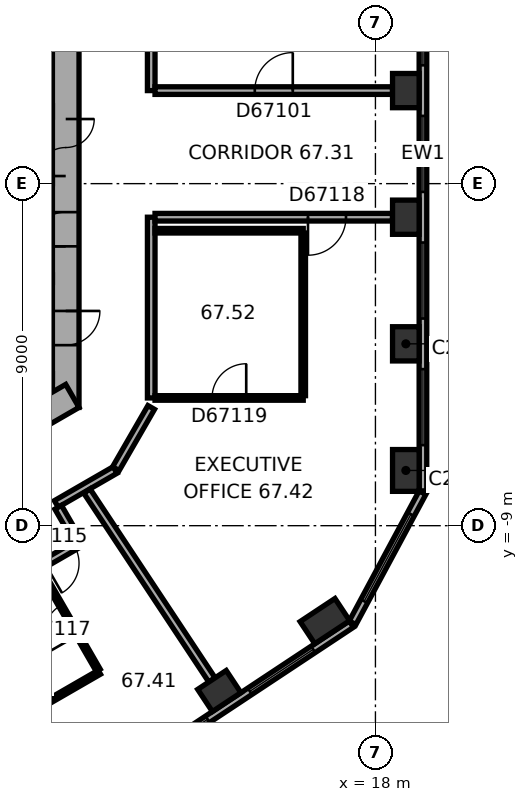
"""IFC4 building model, lengths in metres.
Left out: names, types, materials, properties, quantities, classifications, styles, units other than length and angle.
Written with IfcOpenShell. Run it as: python <this file> out.ifc"""

import sys

from ifc_helpers import new_model, si_unit, direction, frame, frame_2d, origin, origin_2d, place, context, subcontext, project, spatial, rectangle, extrude, element, fill, save


model = new_model("IFC4")
c1 = context("Model", 3, precision=1e-05, world=origin(), true_north=direction((0.0, 1.0)))
c2 = subcontext(c1, "Body", "Model", "MODEL_VIEW")
j1 = project(units=[si_unit("LENGTHUNIT", "METRE"), si_unit("PLANEANGLEUNIT", "RADIAN")], contexts=[c1])
p1 = place(None, origin())
s1 = spatial("IfcSite", under=j1, at=p1, CompositionType="ELEMENT")
p2 = place(p1, origin())
s2 = spatial("IfcBuilding", under=s1, at=p2, CompositionType="ELEMENT")
p3 = place(p2, frame((0.0, 0.0, 270.9)))
s3 = spatial("IfcBuildingStorey", under=s2, at=p3, CompositionType="ELEMENT", Elevation=270.9)
p4 = place(p3, frame((18.8, -7.547, 0.0), z_axis=(0.0, 0.0, 1.0), x_axis=(0.0, 1.0, 0.0)))
e1 = element("IfcColumn", 1, at=p4, inside=s3, PredefinedType="COLUMN", context=c2, shape_type="SweptSolid", body=[
    extrude(rectangle(XDim=1.1, YDim=0.7, at=origin_2d()), origin(), (0.0, 0.0, 1.0), 3.7),
])
for number, where, z_axis, x_axis in (
    (2, (18.8, -4.215, 0.0), (0.0, 0.0, 1.0), (0.0, 1.0, 0.0)),
    (3, (18.8, -0.883, 0.0), (0.0, 0.0, 1.0), (0.0, 1.0, 0.0)),
    (4, (18.8, 2.448, 0.0), (0.0, 0.0, 1.0), (0.0, 1.0, 0.0)),
    (5, (13.891, -13.351, 0.0), (0.0, 0.0, 1.0), (0.834, 0.552, 0.0)),
):
    element("IfcColumn", number, at=place(p3, frame(where, z_axis=z_axis, x_axis=x_axis)), inside=s3, PredefinedType="COLUMN", context=c2, shape_type="SweptSolid", body=[
        extrude(rectangle(XDim=0.9, YDim=0.7, at=origin_2d()), origin(), (0.0, 0.0, 1.0), 3.7),
    ])
p5 = place(p3, frame((16.669, -11.512, 0.0), z_axis=(0.0, 0.0, 1.0), x_axis=(0.833885822067, 0.551936985312, 0.0)))
e6 = element("IfcColumn", 6, at=p5, inside=s3, PredefinedType="COLUMN", context=c2, shape_type="SweptSolid", body=[
    extrude(rectangle(XDim=1.1, YDim=0.7, at=origin_2d()), origin(), (0.0, 0.0, 1.0), 3.7),
])
p6 = place(p3, frame((9.85, -5.889, 0.0), z_axis=(0.0, 0.0, 1.0), x_axis=(0.0, 1.0, 0.0)))
e7 = element("IfcWall", 7, at=p6, inside=s3, PredefinedType="SHEAR", context=c2, shape_type="SweptSolid", body=[
    extrude(rectangle(XDim=11.778, YDim=0.7, at=frame_2d((5.889, 0.0))), origin(), (0.0, 0.0, 1.0), 3.7),
])
p7 = place(p6, frame((6.089, 0.0, 0.0)))
e8 = element("IfcOpeningElement", 8, at=p7, cuts=e7, PredefinedType="OPENING", context=c2, shape_type="SweptSolid", body=[
    extrude(rectangle(XDim=1.5, YDim=2.1, at=frame_2d((0.75, 1.05))), frame((0.0, 0.36, 0.0), z_axis=(0.0, -1.0, 0.0), x_axis=(1.0, 0.0, 0.0)), (0.0, 0.0, 1.0), 0.72),
])
p8 = place(p6, frame((1.639, 0.0, 0.0)))
e9 = element("IfcOpeningElement", 9, at=p8, cuts=e7, PredefinedType="OPENING", context=c2, shape_type="SweptSolid", body=[
    extrude(rectangle(XDim=0.9, YDim=2.1, at=frame_2d((0.45, 1.05))), frame((0.0, 0.36, 0.0), z_axis=(0.0, -1.0, 0.0), x_axis=(1.0, 0.0, 0.0)), (0.0, 0.0, 1.0), 0.72),
])
p9 = place(p6, frame((4.239, 0.0, 0.0)))
e10 = element("IfcOpeningElement", 10, at=p9, cuts=e7, PredefinedType="OPENING", context=c2, shape_type="SweptSolid", body=[
    extrude(rectangle(XDim=0.9, YDim=2.1, at=frame_2d((0.45, 1.05))), frame((0.0, 0.36, 0.0), z_axis=(0.0, -1.0, 0.0), x_axis=(1.0, 0.0, 0.0)), (0.0, 0.0, 1.0), 0.72),
])
p10 = place(p3, frame((-0.175, -11.475, 0.0), z_axis=(0.0, 0.0, 1.0), x_axis=(0.866026453023, 0.499998182661, 0.0)))
e11 = element("IfcWall", 11, at=p10, inside=s3, PredefinedType="SHEAR", context=c2, shape_type="SweptSolid", body=[
    extrude(rectangle(XDim=11.778, YDim=0.7, at=frame_2d((5.889, 0.0))), origin(), (0.0, 0.0, 1.0), 3.7),
])
p11 = place(p10, frame((2.439, 0.0, 0.0)))
e12 = element("IfcOpeningElement", 12, at=p11, cuts=e11, PredefinedType="OPENING", context=c2, shape_type="SweptSolid", body=[
    extrude(rectangle(XDim=1.1, YDim=2.1, at=frame_2d((0.55, 1.05))), frame((0.0, 0.36, 0.0), z_axis=(0.0, -1.0, 0.0), x_axis=(1.0, 0.0, 0.0)), (0.0, 0.0, 1.0), 0.72),
])
p12 = place(p10, frame((5.039, 0.0, 0.0)))
e13 = element("IfcOpeningElement", 13, at=p12, cuts=e11, PredefinedType="OPENING", context=c2, shape_type="SweptSolid", body=[
    extrude(rectangle(XDim=1.1, YDim=2.1, at=frame_2d((0.55, 1.05))), frame((0.0, 0.36, 0.0), z_axis=(0.0, -1.0, 0.0), x_axis=(1.0, 0.0, 0.0)), (0.0, 0.0, 1.0), 0.72),
])
p13 = place(p10, frame((7.639, 0.0, 0.0)))
e14 = element("IfcOpeningElement", 14, at=p13, cuts=e11, PredefinedType="OPENING", context=c2, shape_type="SweptSolid", body=[
    extrude(rectangle(XDim=1.1, YDim=2.1, at=frame_2d((0.55, 1.05))), frame((0.0, 0.36, 0.0), z_axis=(0.0, -1.0, 0.0), x_axis=(1.0, 0.0, 0.0)), (0.0, 0.0, 1.0), 0.72),
])
p14 = place(p3, frame((19.25, -8.084, 0.0), z_axis=(0.0, 0.0, 1.0), x_axis=(0.0, 1.0, 0.0)))
e15 = element("IfcWall", 15, at=p14, inside=s3, PredefinedType="STANDARD", context=c2, shape_type="SweptSolid", body=[
    extrude(rectangle(XDim=17.731, YDim=0.2, at=frame_2d((8.866, 0.0))), origin(), (0.0, 0.0, 1.0), 3.7),
])
p15 = place(p14, frame((1.203, 0.0, 0.9)))
e16 = element("IfcOpeningElement", 16, at=p15, cuts=e15, PredefinedType="OPENING", context=c2, shape_type="SweptSolid", body=[
    extrude(rectangle(XDim=2.0, YDim=2.0, at=frame_2d((1.0, 1.0))), frame((0.0, 0.11, 0.0), z_axis=(0.0, -1.0, 0.0), x_axis=(1.0, 0.0, 0.0)), (0.0, 0.0, 1.0), 0.22),
])
p16 = place(p14, frame((4.535, 0.0, 0.9)))
e17 = element("IfcOpeningElement", 17, at=p16, cuts=e15, PredefinedType="OPENING", context=c2, shape_type="SweptSolid", body=[
    extrude(rectangle(XDim=2.0, YDim=2.0, at=frame_2d((1.0, 1.0))), frame((0.0, 0.11, 0.0), z_axis=(0.0, -1.0, 0.0), x_axis=(1.0, 0.0, 0.0)), (0.0, 0.0, 1.0), 0.22),
])
p17 = place(p14, frame((7.866, 0.0, 0.9)))
e18 = element("IfcOpeningElement", 18, at=p17, cuts=e15, PredefinedType="OPENING", context=c2, shape_type="SweptSolid", body=[
    extrude(rectangle(XDim=2.0, YDim=2.0, at=frame_2d((1.0, 1.0))), frame((0.0, 0.11, 0.0), z_axis=(0.0, -1.0, 0.0), x_axis=(1.0, 0.0, 0.0)), (0.0, 0.0, 1.0), 0.22),
])
p18 = place(p14, frame((11.198, 0.0, 0.9)))
e19 = element("IfcOpeningElement", 19, at=p18, cuts=e15, PredefinedType="OPENING", context=c2, shape_type="SweptSolid", body=[
    extrude(rectangle(XDim=2.0, YDim=2.0, at=frame_2d((1.0, 1.0))), frame((0.0, 0.11, 0.0), z_axis=(0.0, -1.0, 0.0), x_axis=(1.0, 0.0, 0.0)), (0.0, 0.0, 1.0), 0.22),
])
p19 = place(p14, frame((14.53, 0.0, 0.9)))
e20 = element("IfcOpeningElement", 20, at=p19, cuts=e15, PredefinedType="OPENING", context=c2, shape_type="SweptSolid", body=[
    extrude(rectangle(XDim=2.0, YDim=2.0, at=frame_2d((1.0, 1.0))), frame((0.0, 0.11, 0.0), z_axis=(0.0, -1.0, 0.0), x_axis=(1.0, 0.0, 0.0)), (0.0, 0.0, 1.0), 0.22),
])
p20 = place(p3, frame((2.58, -21.377, 0.0), z_axis=(0.0, 0.0, 1.0), x_axis=(0.833888592176, 0.551932800112, 0.0)))
e21 = element("IfcWall", 21, at=p20, inside=s3, PredefinedType="STANDARD", context=c2, shape_type="SweptSolid", body=[
    extrude(rectangle(XDim=17.731, YDim=0.2, at=frame_2d((8.866, 0.0))), origin(), (0.0, 0.0, 1.0), 3.7),
])
p21 = place(p20, frame((1.202, 0.0, 0.9)))
e22 = element("IfcOpeningElement", 22, at=p21, cuts=e21, PredefinedType="OPENING", context=c2, shape_type="SweptSolid", body=[
    extrude(rectangle(XDim=2.0, YDim=2.0, at=frame_2d((1.0, 1.0))), frame((0.0, 0.11, 0.0), z_axis=(0.0, -1.0, 0.0), x_axis=(1.0, 0.0, 0.0)), (0.0, 0.0, 1.0), 0.22),
])
p22 = place(p20, frame((4.533, 0.0, 0.9)))
e23 = element("IfcOpeningElement", 23, at=p22, cuts=e21, PredefinedType="OPENING", context=c2, shape_type="SweptSolid", body=[
    extrude(rectangle(XDim=2.0, YDim=2.0, at=frame_2d((1.0, 1.0))), frame((0.0, 0.11, 0.0), z_axis=(0.0, -1.0, 0.0), x_axis=(1.0, 0.0, 0.0)), (0.0, 0.0, 1.0), 0.22),
])
p23 = place(p20, frame((7.865, 0.0, 0.9)))
e24 = element("IfcOpeningElement", 24, at=p23, cuts=e21, PredefinedType="OPENING", context=c2, shape_type="SweptSolid", body=[
    extrude(rectangle(XDim=2.0, YDim=2.0, at=frame_2d((1.0, 1.0))), frame((0.0, 0.11, 0.0), z_axis=(0.0, -1.0, 0.0), x_axis=(1.0, 0.0, 0.0)), (0.0, 0.0, 1.0), 0.22),
])
p24 = place(p20, frame((11.197, 0.0, 0.9)))
e25 = element("IfcOpeningElement", 25, at=p24, cuts=e21, PredefinedType="OPENING", context=c2, shape_type="SweptSolid", body=[
    extrude(rectangle(XDim=2.0, YDim=2.0, at=frame_2d((1.0, 1.0))), frame((0.0, 0.11, 0.0), z_axis=(0.0, -1.0, 0.0), x_axis=(1.0, 0.0, 0.0)), (0.0, 0.0, 1.0), 0.22),
])
p25 = place(p20, frame((14.528, 0.0, 0.9)))
e26 = element("IfcOpeningElement", 26, at=p25, cuts=e21, PredefinedType="OPENING", context=c2, shape_type="SweptSolid", body=[
    extrude(rectangle(XDim=2.0, YDim=2.0, at=frame_2d((1.0, 1.0))), frame((0.0, 0.11, 0.0), z_axis=(0.0, -1.0, 0.0), x_axis=(1.0, 0.0, 0.0)), (0.0, 0.0, 1.0), 0.22),
])
p26 = place(p3, frame((17.399, -11.554, 0.0), z_axis=(0.0, 0.0, 1.0), x_axis=(0.473309051311, 0.880896442238, 0.0)))
e27 = element("IfcWall", 27, at=p26, inside=s3, PredefinedType="STANDARD", context=c2, shape_type="SweptSolid", body=[
    extrude(rectangle(XDim=3.886, YDim=0.2, at=frame_2d((1.943, 0.0))), origin(), (0.0, 0.0, 1.0), 3.7),
])
p27 = place(p26, frame((0.643, 0.0, 0.9)))
e28 = element("IfcOpeningElement", 28, at=p27, cuts=e27, PredefinedType="OPENING", context=c2, shape_type="SweptSolid", body=[
    extrude(rectangle(XDim=2.6, YDim=2.0, at=frame_2d((1.3, 1.0))), frame((0.0, 0.11, 0.0), z_axis=(0.0, -1.0, 0.0), x_axis=(1.0, 0.0, 0.0)), (0.0, 0.0, 1.0), 0.22),
])
for number, where, z_axis, x_axis in (
    (29, (7.3, -5.1, 0.0), (0.0, 0.0, 1.0), (1.0, 0.0, 0.0)),
    (30, (7.3, -2.5, 0.0), (0.0, 0.0, 1.0), (1.0, 0.0, 0.0)),
    (31, (7.3, 0.1, 0.0), (0.0, 0.0, 1.0), (1.0, 0.0, 0.0)),
):
    element("IfcWall", number, at=place(p3, frame(where, z_axis=z_axis, x_axis=x_axis)), inside=s3, PredefinedType="PARTITIONING", context=c2, shape_type="SweptSolid", body=[
        extrude(rectangle(XDim=2.2, YDim=0.2, at=frame_2d((1.1, 0.0))), origin(), (0.0, 0.0, 1.0), 3.42),
    ])
p28 = place(p3, frame((7.3, 1.9, 0.0), z_axis=(0.0, 0.0, 1.0), x_axis=(1.0, 0.0, 0.0)))
e32 = element("IfcWall", 32, at=p28, inside=s3, PredefinedType="SHEAR", context=c2, shape_type="SweptSolid", body=[
    extrude(rectangle(XDim=2.2, YDim=0.3, at=frame_2d((1.1, 0.0))), origin(), (0.0, 0.0, 1.0), 3.42),
])
p29 = place(p28, frame((0.7, 0.0, 0.0)))
e33 = element("IfcOpeningElement", 33, at=p29, cuts=e32, PredefinedType="OPENING", context=c2, shape_type="SweptSolid", body=[
    extrude(rectangle(XDim=1.1, YDim=2.1, at=frame_2d((0.55, 1.05))), frame((0.0, 0.16, 0.0), z_axis=(0.0, -1.0, 0.0), x_axis=(1.0, 0.0, 0.0)), (0.0, 0.0, 1.0), 0.32),
])
p30 = place(p3, frame((6.71, -11.485, 0.0), z_axis=(0.0, 0.0, 1.0), x_axis=(0.866021232452, 0.500007224889, 0.0)))
e34 = element("IfcWall", 34, at=p30, inside=s3, PredefinedType="PARTITIONING", context=c2, shape_type="SweptSolid", body=[
    extrude(rectangle(XDim=4.032, YDim=0.2, at=frame_2d((2.016, 0.0))), origin(), (0.0, 0.0, 1.0), 3.42),
])
p31 = place(p30, frame((2.991, 0.0, 0.0)))
e35 = element("IfcOpeningElement", 35, at=p31, cuts=e34, PredefinedType="OPENING", context=c2, shape_type="SweptSolid", body=[
    extrude(rectangle(XDim=0.9, YDim=2.1, at=frame_2d((0.45, 1.05))), frame((0.0, 0.11, 0.0), z_axis=(0.0, -1.0, 0.0), x_axis=(1.0, 0.0, 0.0)), (0.0, 0.0, 1.0), 0.22),
])
p32 = place(p3, frame((9.602, -8.428, 0.0), z_axis=(0.0, 0.0, 1.0), x_axis=(0.865999114786, 0.500045531117, 0.0)))
e36 = element("IfcWall", 36, at=p32, inside=s3, PredefinedType="PARTITIONING", context=c2, shape_type="SweptSolid", body=[
    extrude(rectangle(XDim=1.788, YDim=0.2, at=frame_2d((0.894, 0.0))), origin(), (0.0, 0.0, 1.0), 3.42),
])
p33 = place(p3, frame((10.152, -9.382, 0.0), z_axis=(0.0, 0.0, 1.0), x_axis=(-0.499968756647, 0.866043441391, 0.0)))
e37 = element("IfcWall", 37, at=p33, inside=s3, PredefinedType="PARTITIONING", context=c2, shape_type="SweptSolid", body=[
    extrude(rectangle(XDim=1.001, YDim=0.2, at=frame_2d((0.5, 0.0))), origin(), (0.0, 0.0, 1.0), 3.42),
])
p34 = place(p3, frame((10.705, -12.804, 0.0), z_axis=(0.0, 0.0, 1.0), x_axis=(-0.500026023896, 0.86601037836, 0.0)))
e38 = element("IfcWall", 38, at=p34, inside=s3, PredefinedType="PARTITIONING", context=c2, shape_type="SweptSolid", body=[
    extrude(rectangle(XDim=3.04, YDim=0.12, at=frame_2d((1.52, 0.0))), origin(), (0.0, 0.0, 1.0), 3.42),
])
p35 = place(p34, frame((1.07, 0.0, 0.0)))
e39 = element("IfcOpeningElement", 39, at=p35, cuts=e38, PredefinedType="OPENING", context=c2, shape_type="SweptSolid", body=[
    extrude(rectangle(XDim=0.9, YDim=2.1, at=frame_2d((0.45, 1.05))), frame((0.0, 0.07, 0.0), z_axis=(0.0, -1.0, 0.0), x_axis=(1.0, 0.0, 0.0)), (0.0, 0.0, 1.0), 0.14),
])
p36 = place(p3, frame((10.735, -12.856, 0.0), z_axis=(0.0, 0.0, 1.0), x_axis=(-0.865997131366, -0.500048966069, 0.0)))
e40 = element("IfcWall", 40, at=p36, inside=s3, PredefinedType="PARTITIONING", context=c2, shape_type="SweptSolid", body=[
    extrude(rectangle(XDim=2.74, YDim=0.12, at=frame_2d((1.37, 0.0))), origin(), (0.0, 0.0, 1.0), 3.42),
])
p37 = place(p3, frame((11.17, -7.5, 0.0), z_axis=(0.0, 0.0, 1.0), x_axis=(0.500006454166, 0.866021677438, 0.0)))
e41 = element("IfcWall", 41, at=p37, inside=s3, PredefinedType="PARTITIONING", context=c2, shape_type="SweptSolid", body=[
    extrude(rectangle(XDim=1.86, YDim=0.2, at=frame_2d((0.93, 0.0))), origin(), (0.0, 0.0, 1.0), 3.42),
])
p38 = place(p3, frame((12.1, -5.639, 0.0), z_axis=(0.0, 0.0, 1.0), x_axis=(0.0, 1.0, 0.0)))
e42 = element("IfcWall", 42, at=p38, inside=s3, PredefinedType="PARTITIONING", context=c2, shape_type="SweptSolid", body=[
    extrude(rectangle(XDim=4.756, YDim=0.2, at=frame_2d((2.378, 0.0))), origin(), (0.0, 0.0, 1.0), 3.42),
])
p39 = place(p3, frame((12.1, 2.448, 0.0), z_axis=(0.0, 0.0, 1.0), x_axis=(0.0, 1.0, 0.0)))
e43 = element("IfcWall", 43, at=p39, inside=s3, PredefinedType="PARTITIONING", context=c2, shape_type="SweptSolid", body=[
    extrude(rectangle(XDim=3.441, YDim=0.2, at=frame_2d((1.72, 0.0))), origin(), (0.0, 0.0, 1.0), 3.42),
])
p40 = place(p3, frame((12.2, -1.239, 0.0), z_axis=(0.0, 0.0, 1.0), x_axis=(1.0, 0.0, 0.0)))
e44 = element("IfcWall", 44, at=p40, inside=s3, PredefinedType="PARTITIONING", context=c2, shape_type="SweptSolid", body=[
    extrude(rectangle(XDim=3.9, YDim=0.12, at=frame_2d((1.95, 0.0))), origin(), (0.0, 0.0, 1.0), 3.42),
])
p41 = place(p3, frame((12.2, -0.883, 0.0), z_axis=(0.0, 0.0, 1.0), x_axis=(1.0, 0.0, 0.0)))
e45 = element("IfcWall", 45, at=p41, inside=s3, PredefinedType="PARTITIONING", context=c2, shape_type="SweptSolid", body=[
    extrude(rectangle(XDim=6.25, YDim=0.2, at=frame_2d((3.125, 0.0))), origin(), (0.0, 0.0, 1.0), 2.87),
])
p42 = place(p41, frame((4.025, 0.0, 0.0)))
e46 = element("IfcOpeningElement", 46, at=p42, cuts=e45, PredefinedType="OPENING", context=c2, shape_type="SweptSolid", body=[
    extrude(rectangle(XDim=1.0, YDim=2.1, at=frame_2d((0.5, 1.05))), frame((0.0, 0.11, 0.0), z_axis=(0.0, -1.0, 0.0), x_axis=(1.0, 0.0, 0.0)), (0.0, 0.0, 1.0), 0.22),
])
p43 = place(p3, frame((13.698, -13.059, 0.0), z_axis=(0.0, 0.0, 1.0), x_axis=(-0.551927229301, 0.833892279348, 0.0)))
e47 = element("IfcWall", 47, at=p43, inside=s3, PredefinedType="PARTITIONING", context=c2, shape_type="SweptSolid", body=[
    extrude(rectangle(XDim=5.96, YDim=0.2, at=frame_2d((2.98, 0.0))), origin(), (0.0, 0.0, 1.0), 2.87),
])
p44 = place(p3, frame((16.1, -5.639, 0.0), z_axis=(0.0, 0.0, 1.0), x_axis=(-1.0, 0.0, 0.0)))
e48 = element("IfcWall", 48, at=p44, inside=s3, PredefinedType="PARTITIONING", context=c2, shape_type="SweptSolid", body=[
    extrude(rectangle(XDim=3.9, YDim=0.12, at=frame_2d((1.95, 0.0))), origin(), (0.0, 0.0, 1.0), 3.42),
])
p45 = place(p44, frame((1.5, 0.0, 0.0)))
e49 = element("IfcOpeningElement", 49, at=p45, cuts=e48, PredefinedType="OPENING", context=c2, shape_type="SweptSolid", body=[
    extrude(rectangle(XDim=0.9, YDim=2.1, at=frame_2d((0.45, 1.05))), frame((0.0, 0.07, 0.0), z_axis=(0.0, -1.0, 0.0), x_axis=(1.0, 0.0, 0.0)), (0.0, 0.0, 1.0), 0.14),
])
p46 = place(p3, frame((16.1, -1.299, 0.0), z_axis=(0.0, 0.0, 1.0), x_axis=(0.0, -1.0, 0.0)))
e50 = element("IfcWall", 50, at=p46, inside=s3, PredefinedType="PARTITIONING", context=c2, shape_type="SweptSolid", body=[
    extrude(rectangle(XDim=4.28, YDim=0.12, at=frame_2d((2.14, 0.0))), origin(), (0.0, 0.0, 1.0), 3.42),
])
p47 = place(p3, frame((18.45, 2.448, 0.0), z_axis=(0.0, 0.0, 1.0), x_axis=(-1.0, 0.0, 0.0)))
e51 = element("IfcWall", 51, at=p47, inside=s3, PredefinedType="PARTITIONING", context=c2, shape_type="SweptSolid", body=[
    extrude(rectangle(XDim=6.25, YDim=0.2, at=frame_2d((3.125, 0.0))), origin(), (0.0, 0.0, 1.0), 3.42),
])
p48 = place(p47, frame((2.625, 0.0, 0.0)))
e52 = element("IfcOpeningElement", 52, at=p48, cuts=e51, PredefinedType="OPENING", context=c2, shape_type="SweptSolid", body=[
    extrude(rectangle(XDim=1.0, YDim=2.1, at=frame_2d((0.5, 1.05))), frame((0.0, 0.11, 0.0), z_axis=(0.0, -1.0, 0.0), x_axis=(1.0, 0.0, 0.0)), (0.0, 0.0, 1.0), 0.22),
])
p49 = place(p15, origin())
e53 = element("IfcWindow", 53, at=p49, inside=s3, PartitioningType="SINGLE_PANEL", PredefinedType="WINDOW", context=c2, shape_type="SweptSolid", body=[
    extrude(rectangle(XDim=2.0, YDim=2.0, at=frame_2d((1.0, 1.0))), frame((0.0, 0.03, 0.0), z_axis=(0.0, -1.0, 0.0), x_axis=(1.0, 0.0, 0.0)), (0.0, 0.0, 1.0), 0.06),
])
fill(e16, e53)
p50 = place(p16, origin())
e54 = element("IfcWindow", 54, at=p50, inside=s3, PartitioningType="SINGLE_PANEL", PredefinedType="WINDOW", context=c2, shape_type="SweptSolid", body=[
    extrude(rectangle(XDim=2.0, YDim=2.0, at=frame_2d((1.0, 1.0))), frame((0.0, 0.03, 0.0), z_axis=(0.0, -1.0, 0.0), x_axis=(1.0, 0.0, 0.0)), (0.0, 0.0, 1.0), 0.06),
])
fill(e17, e54)
p51 = place(p17, origin())
e55 = element("IfcWindow", 55, at=p51, inside=s3, PartitioningType="SINGLE_PANEL", PredefinedType="WINDOW", context=c2, shape_type="SweptSolid", body=[
    extrude(rectangle(XDim=2.0, YDim=2.0, at=frame_2d((1.0, 1.0))), frame((0.0, 0.03, 0.0), z_axis=(0.0, -1.0, 0.0), x_axis=(1.0, 0.0, 0.0)), (0.0, 0.0, 1.0), 0.06),
])
fill(e18, e55)
p52 = place(p18, origin())
e56 = element("IfcWindow", 56, at=p52, inside=s3, PartitioningType="SINGLE_PANEL", PredefinedType="WINDOW", context=c2, shape_type="SweptSolid", body=[
    extrude(rectangle(XDim=2.0, YDim=2.0, at=frame_2d((1.0, 1.0))), frame((0.0, 0.03, 0.0), z_axis=(0.0, -1.0, 0.0), x_axis=(1.0, 0.0, 0.0)), (0.0, 0.0, 1.0), 0.06),
])
fill(e19, e56)
p53 = place(p24, origin())
e57 = element("IfcWindow", 57, at=p53, inside=s3, PartitioningType="SINGLE_PANEL", PredefinedType="WINDOW", context=c2, shape_type="SweptSolid", body=[
    extrude(rectangle(XDim=2.0, YDim=2.0, at=frame_2d((1.0, 1.0))), frame((0.0, 0.03, 0.0), z_axis=(0.0, -1.0, 0.0), x_axis=(1.0, 0.0, 0.0)), (0.0, 0.0, 1.0), 0.06),
])
fill(e25, e57)
p54 = place(p25, origin())
e58 = element("IfcWindow", 58, at=p54, inside=s3, PartitioningType="SINGLE_PANEL", PredefinedType="WINDOW", context=c2, shape_type="SweptSolid", body=[
    extrude(rectangle(XDim=2.0, YDim=2.0, at=frame_2d((1.0, 1.0))), frame((0.0, 0.03, 0.0), z_axis=(0.0, -1.0, 0.0), x_axis=(1.0, 0.0, 0.0)), (0.0, 0.0, 1.0), 0.06),
])
fill(e26, e58)
p55 = place(p27, origin())
e59 = element("IfcWindow", 59, at=p55, inside=s3, PartitioningType="SINGLE_PANEL", PredefinedType="WINDOW", context=c2, shape_type="SweptSolid", body=[
    extrude(rectangle(XDim=2.6, YDim=2.0, at=frame_2d((1.3, 1.0))), frame((0.0, 0.03, 0.0), z_axis=(0.0, -1.0, 0.0), x_axis=(1.0, 0.0, 0.0)), (0.0, 0.0, 1.0), 0.06),
])
fill(e28, e59)
p56 = place(p7, origin())
e60 = element("IfcDoor", 60, at=p56, inside=s3, OperationType="DOUBLE_DOOR_SINGLE_SWING", PredefinedType="DOOR", context=c2, shape_type="SweptSolid", body=[
    extrude(rectangle(XDim=1.5, YDim=2.1, at=frame_2d((0.75, 1.05))), frame((0.0, 0.025, 0.0), z_axis=(0.0, -1.0, 0.0), x_axis=(1.0, 0.0, 0.0)), (0.0, 0.0, 1.0), 0.05),
])
fill(e8, e60)
p57 = place(p8, origin())
e61 = element("IfcDoor", 61, at=p57, inside=s3, OperationType="SINGLE_SWING_LEFT", PredefinedType="DOOR", context=c2, shape_type="SweptSolid", body=[
    extrude(rectangle(XDim=0.9, YDim=2.1, at=frame_2d((0.45, 1.05))), frame((0.0, 0.025, 0.0), z_axis=(0.0, -1.0, 0.0), x_axis=(1.0, 0.0, 0.0)), (0.0, 0.0, 1.0), 0.05),
])
fill(e9, e61)
p58 = place(p9, origin())
e62 = element("IfcDoor", 62, at=p58, inside=s3, OperationType="SINGLE_SWING_LEFT", PredefinedType="DOOR", context=c2, shape_type="SweptSolid", body=[
    extrude(rectangle(XDim=0.9, YDim=2.1, at=frame_2d((0.45, 1.05))), frame((0.0, 0.025, 0.0), z_axis=(0.0, -1.0, 0.0), x_axis=(1.0, 0.0, 0.0)), (0.0, 0.0, 1.0), 0.05),
])
fill(e10, e62)
p59 = place(p48, origin())
e63 = element("IfcDoor", 63, at=p59, inside=s3, OperationType="SINGLE_SWING_LEFT", PredefinedType="DOOR", context=c2, shape_type="SweptSolid", body=[
    extrude(rectangle(XDim=1.0, YDim=2.1, at=frame_2d((0.5, 1.05))), frame((0.0, 0.025, 0.0), z_axis=(0.0, -1.0, 0.0), x_axis=(1.0, 0.0, 0.0)), (0.0, 0.0, 1.0), 0.05),
])
fill(e52, e63)
p60 = place(p31, origin())
e64 = element("IfcDoor", 64, at=p60, inside=s3, OperationType="SINGLE_SWING_LEFT", PredefinedType="DOOR", context=c2, shape_type="SweptSolid", body=[
    extrude(rectangle(XDim=0.9, YDim=2.1, at=frame_2d((0.45, 1.05))), frame((0.0, 0.025, 0.0), z_axis=(0.0, -1.0, 0.0), x_axis=(1.0, 0.0, 0.0)), (0.0, 0.0, 1.0), 0.05),
])
fill(e35, e64)
p61 = place(p35, origin())
e65 = element("IfcDoor", 65, at=p61, inside=s3, OperationType="SINGLE_SWING_LEFT", PredefinedType="DOOR", context=c2, shape_type="SweptSolid", body=[
    extrude(rectangle(XDim=0.9, YDim=2.1, at=frame_2d((0.45, 1.05))), frame((0.0, 0.025, 0.0), z_axis=(0.0, -1.0, 0.0), x_axis=(1.0, 0.0, 0.0)), (0.0, 0.0, 1.0), 0.05),
])
fill(e39, e65)
p62 = place(p42, origin())
e66 = element("IfcDoor", 66, at=p62, inside=s3, OperationType="SINGLE_SWING_LEFT", PredefinedType="DOOR", context=c2, shape_type="SweptSolid", body=[
    extrude(rectangle(XDim=1.0, YDim=2.1, at=frame_2d((0.5, 1.05))), frame((0.0, 0.025, 0.0), z_axis=(0.0, -1.0, 0.0), x_axis=(1.0, 0.0, 0.0)), (0.0, 0.0, 1.0), 0.05),
])
fill(e46, e66)
p63 = place(p45, origin())
e67 = element("IfcDoor", 67, at=p63, inside=s3, OperationType="SINGLE_SWING_LEFT", PredefinedType="DOOR", context=c2, shape_type="SweptSolid", body=[
    extrude(rectangle(XDim=0.9, YDim=2.1, at=frame_2d((0.45, 1.05))), frame((0.0, 0.025, 0.0), z_axis=(0.0, -1.0, 0.0), x_axis=(1.0, 0.0, 0.0)), (0.0, 0.0, 1.0), 0.05),
])
fill(e49, e67)
save(model, sys.argv[1])
